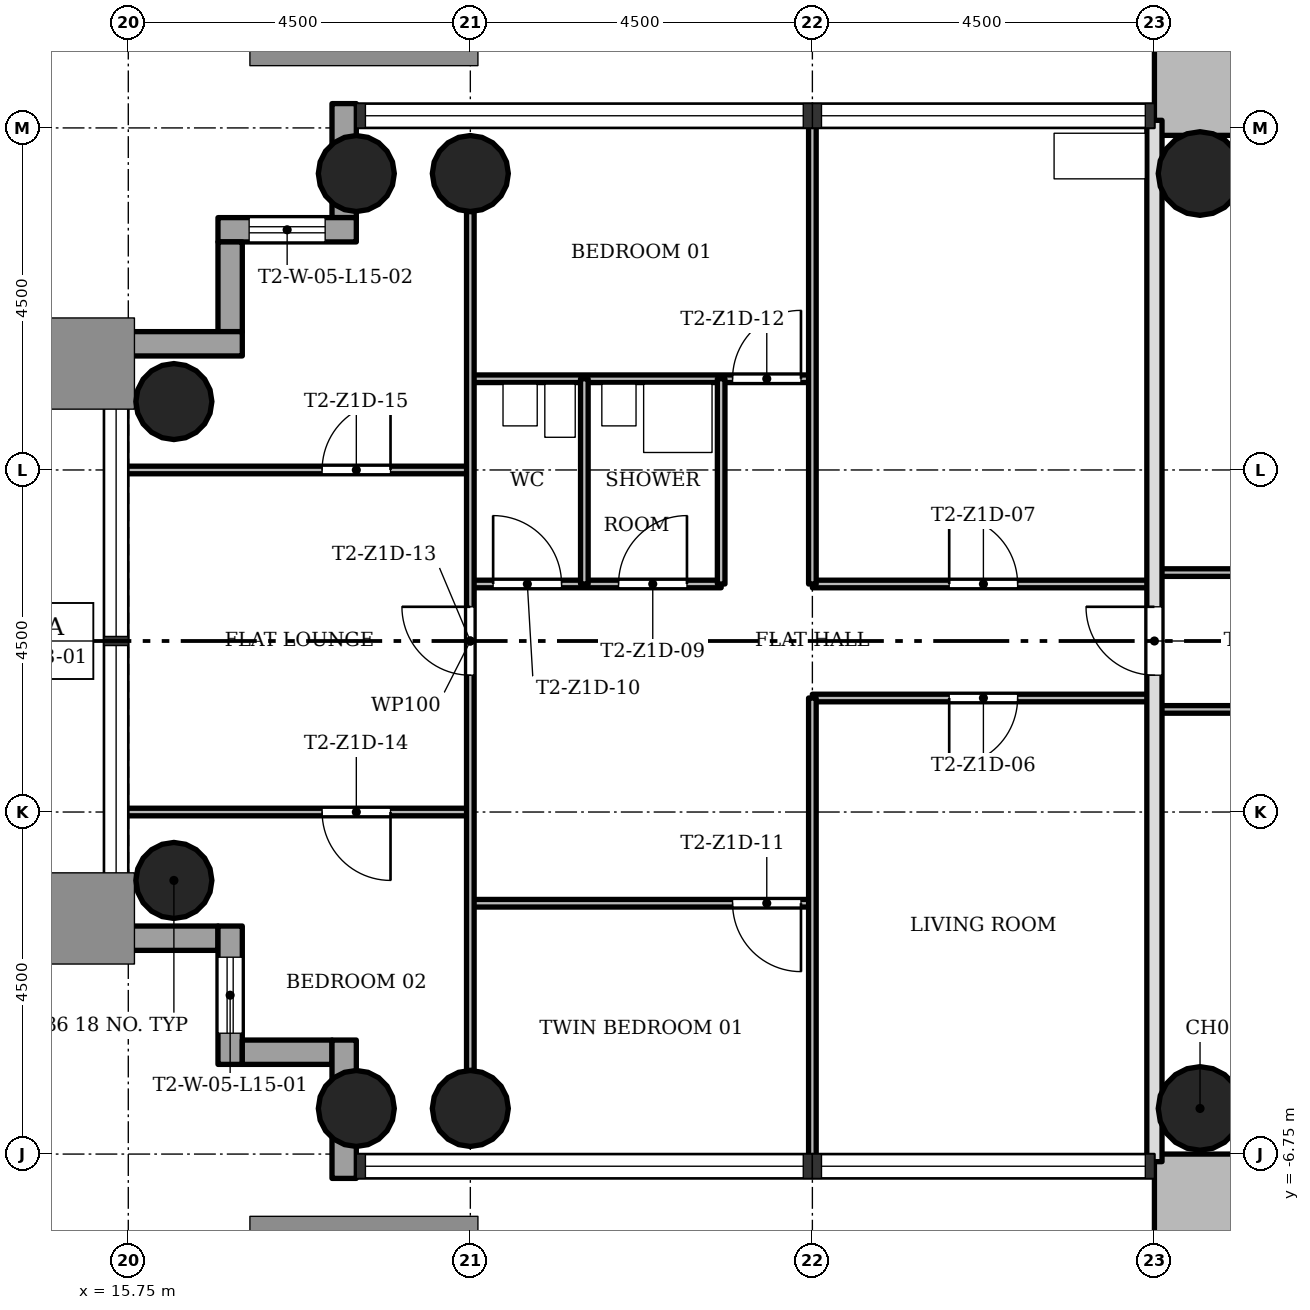
"""IFC4 building model, lengths in metres.
Left out: names, types, materials, properties, quantities, classifications, styles, units other than length and angle.
Written with IfcOpenShell. Run it as: python <this file> out.ifc"""

import sys

from ifc_helpers import new_model, si_unit, direction, frame, frame_2d, origin, origin_2d, place, context, subcontext, project, spatial, rectangle, hollow_circle, extrude, element, fill, save


model = new_model("IFC4")
c1 = context("Model", 3, precision=1e-05, world=origin(), true_north=direction((0.0, 1.0)))
c2 = subcontext(c1, "Body", "Model", "MODEL_VIEW")
j1 = project(units=[si_unit("LENGTHUNIT", "METRE"), si_unit("PLANEANGLEUNIT", "RADIAN")], contexts=[c1])
p1 = place(None, origin())
s1 = spatial("IfcSite", under=j1, at=p1, CompositionType="ELEMENT")
p2 = place(p1, origin())
s2 = spatial("IfcBuilding", under=s1, at=p2, CompositionType="ELEMENT")
p3 = place(p2, frame((0.0, 0.0, 58.5)))
s3 = spatial("IfcBuildingStorey", under=s2, at=p3, CompositionType="ELEMENT", Elevation=58.5)
p4 = place(p3, frame((29.8, 15.248, 0.0), z_axis=(0.0, 0.0, 1.0), x_axis=(0.0, -1.0, 0.0)))
e1 = element("IfcWall", 1, at=p4, inside=s3, PredefinedType="SHEAR", context=c2, shape_type="SweptSolid", body=[
    extrude(rectangle(XDim=8.596, YDim=1.1, at=frame_2d((4.298, 0.0))), origin(), (0.0, 0.0, 1.0), 3.4),
])
p5 = place(p3, frame((41.65, -7.3, 0.0), z_axis=(0.0, 0.0, 1.0), x_axis=(-1.0, 0.0, 0.0)))
e2 = element("IfcWall", 2, at=p5, inside=s3, PredefinedType="SHEAR", context=c2, shape_type="SweptSolid", body=[
    extrude(rectangle(XDim=12.4, YDim=1.1, at=frame_2d((6.2, 0.0))), origin(), (0.0, 0.0, 1.0), 3.4),
])
p6 = place(p5, frame((4.75, 0.0, 0.0)))
e3 = element("IfcOpeningElement", 3, at=p6, cuts=e2, PredefinedType="OPENING", context=c2, shape_type="SweptSolid", body=[
    extrude(rectangle(XDim=1.8, YDim=2.1, at=frame_2d((0.9, 1.05))), frame((0.0, 0.56, 0.0), z_axis=(0.0, -1.0, 0.0), x_axis=(1.0, 0.0, 0.0)), (0.0, 0.0, 1.0), 1.12),
])
for number, where, z_axis, x_axis in (
    (4, (20.25, 6.15, 0.0), (0.0, 0.0, 1.0), (1.0, 0.0, 0.0)),
    (5, (20.25, -6.15, 0.0), (0.0, 0.0, 1.0), (1.0, 0.0, 0.0)),
    (6, (18.75, 6.15, 0.0), (0.0, 0.0, 1.0), (1.0, 0.0, 0.0)),
    (7, (18.75, -6.15, 0.0), (0.0, 0.0, 1.0), (1.0, 0.0, 0.0)),
    (8, (16.35, 3.15, 0.0), (0.0, 0.0, 1.0), (1.0, 0.0, 0.0)),
    (9, (16.35, -3.15, 0.0), (0.0, 0.0, 1.0), (1.0, 0.0, 0.0)),
):
    element("IfcColumn", number, at=place(p3, frame(where, z_axis=z_axis, x_axis=x_axis)), inside=s3, PredefinedType="COLUMN", context=c2, shape_type="SweptSolid", body=[
        extrude(hollow_circle(Radius=0.5, WallThickness=0.036, at=origin_2d()), origin(), (0.0, 0.0, 1.0), 3.4),
    ])
for number, where, z_axis, x_axis in (
    (10, (29.85, 6.15, 0.0), (0.0, 0.0, 1.0), (1.0, 0.0, 0.0)),
    (11, (29.85, -6.15, 0.0), (0.0, 0.0, 1.0), (1.0, 0.0, 0.0)),
):
    element("IfcColumn", number, at=place(p3, frame(where, z_axis=z_axis, x_axis=x_axis)), inside=s3, PredefinedType="COLUMN", context=c2, shape_type="SweptSolid", body=[
        extrude(hollow_circle(Radius=0.55, WallThickness=0.04, at=origin_2d()), origin(), (0.0, 0.0, 1.0), 3.4),
    ])
p7 = place(p3, frame((18.59, 7.07, -0.3), z_axis=(0.0, 0.0, 1.0), x_axis=(0.0, -1.0, 0.0)))
e12 = element("IfcWall", 12, at=p7, inside=s3, PredefinedType="STANDARD", context=c2, shape_type="SweptSolid", body=[
    extrude(rectangle(XDim=1.5, YDim=0.32, at=frame_2d((0.75, 0.0))), origin(), (0.0, 0.0, 1.0), 3.4),
])
p8 = place(p3, frame((18.75, 5.41, -0.3), z_axis=(0.0, 0.0, 1.0), x_axis=(-1.0, 0.0, 0.0)))
e13 = element("IfcWall", 13, at=p8, inside=s3, PredefinedType="STANDARD", context=c2, shape_type="SweptSolid", body=[
    extrude(rectangle(XDim=1.82, YDim=0.32, at=frame_2d((0.91, 0.0))), origin(), (0.0, 0.0, 1.0), 3.4),
])
p9 = place(p8, frame((0.41, 0.0, 1.2)))
e14 = element("IfcOpeningElement", 14, at=p9, cuts=e13, PredefinedType="OPENING", context=c2, shape_type="SweptSolid", body=[
    extrude(rectangle(XDim=1.0, YDim=1.5, at=frame_2d((0.5, 0.75))), frame((0.0, 0.17, 0.0), z_axis=(0.0, -1.0, 0.0), x_axis=(1.0, 0.0, 0.0)), (0.0, 0.0, 1.0), 0.34),
])
p10 = place(p3, frame((17.09, 5.25, -0.3), z_axis=(0.0, 0.0, 1.0), x_axis=(0.0, -1.0, 0.0)))
e15 = element("IfcWall", 15, at=p10, inside=s3, PredefinedType="STANDARD", context=c2, shape_type="SweptSolid", body=[
    extrude(rectangle(XDim=1.18, YDim=0.32, at=frame_2d((0.59, 0.0))), origin(), (0.0, 0.0, 1.0), 3.4),
])
p11 = place(p3, frame((17.25, 3.91, -0.3), z_axis=(0.0, 0.0, 1.0), x_axis=(-1.0, 0.0, 0.0)))
e16 = element("IfcWall", 16, at=p11, inside=s3, PredefinedType="STANDARD", context=c2, shape_type="SweptSolid", body=[
    extrude(rectangle(XDim=1.82, YDim=0.32, at=frame_2d((0.91, 0.0))), origin(), (0.0, 0.0, 1.0), 3.4),
])
p12 = place(p3, frame((15.43, -3.91, -0.3), z_axis=(0.0, 0.0, 1.0), x_axis=(1.0, 0.0, 0.0)))
e17 = element("IfcWall", 17, at=p12, inside=s3, PredefinedType="STANDARD", context=c2, shape_type="SweptSolid", body=[
    extrude(rectangle(XDim=1.5, YDim=0.32, at=frame_2d((0.75, 0.0))), origin(), (0.0, 0.0, 1.0), 3.4),
])
p13 = place(p3, frame((17.09, -3.75, -0.3), z_axis=(0.0, 0.0, 1.0), x_axis=(0.0, -1.0, 0.0)))
e18 = element("IfcWall", 18, at=p13, inside=s3, PredefinedType="STANDARD", context=c2, shape_type="SweptSolid", body=[
    extrude(rectangle(XDim=1.82, YDim=0.32, at=frame_2d((0.91, 0.0))), origin(), (0.0, 0.0, 1.0), 3.4),
])
p14 = place(p13, frame((0.41, 0.0, 1.2)))
e19 = element("IfcOpeningElement", 19, at=p14, cuts=e18, PredefinedType="OPENING", context=c2, shape_type="SweptSolid", body=[
    extrude(rectangle(XDim=1.0, YDim=1.5, at=frame_2d((0.5, 0.75))), frame((0.0, 0.17, 0.0), z_axis=(0.0, -1.0, 0.0), x_axis=(1.0, 0.0, 0.0)), (0.0, 0.0, 1.0), 0.34),
])
p15 = place(p3, frame((17.25, -5.41, -0.3), z_axis=(0.0, 0.0, 1.0), x_axis=(1.0, 0.0, 0.0)))
e20 = element("IfcWall", 20, at=p15, inside=s3, PredefinedType="STANDARD", context=c2, shape_type="SweptSolid", body=[
    extrude(rectangle(XDim=1.18, YDim=0.32, at=frame_2d((0.59, 0.0))), origin(), (0.0, 0.0, 1.0), 3.4),
])
p16 = place(p3, frame((18.59, -5.25, -0.3), z_axis=(0.0, 0.0, 1.0), x_axis=(0.0, -1.0, 0.0)))
e21 = element("IfcWall", 21, at=p16, inside=s3, PredefinedType="STANDARD", context=c2, shape_type="SweptSolid", body=[
    extrude(rectangle(XDim=1.82, YDim=0.32, at=frame_2d((0.91, 0.0))), origin(), (0.0, 0.0, 1.0), 3.4),
])
p17 = place(p3, frame((24.75, -3.45, 0.0), z_axis=(0.0, 0.0, 1.0), x_axis=(-1.0, 0.0, 0.0)))
e22 = element("IfcWall", 22, at=p17, inside=s3, PredefinedType="PARTITIONING", context=c2, shape_type="SweptSolid", body=[
    extrude(rectangle(XDim=4.5, YDim=0.1, at=frame_2d((2.25, 0.0))), origin(), (0.0, 0.0, 1.0), 3.0),
])
p18 = place(p17, frame((0.15, 0.0, 0.0)))
e23 = element("IfcOpeningElement", 23, at=p18, cuts=e22, PredefinedType="OPENING", context=c2, shape_type="SweptSolid", body=[
    extrude(rectangle(XDim=0.9, YDim=2.1, at=frame_2d((0.45, 1.05))), frame((0.0, 0.06, 0.0), z_axis=(0.0, -1.0, 0.0), x_axis=(1.0, 0.0, 0.0)), (0.0, 0.0, 1.0), 0.12),
])
p19 = place(p3, frame((20.25, -2.25, 0.0), z_axis=(0.0, 0.0, 1.0), x_axis=(-1.0, 0.0, 0.0)))
e24 = element("IfcWall", 24, at=p19, inside=s3, PredefinedType="PARTITIONING", context=c2, shape_type="SweptSolid", body=[
    extrude(rectangle(XDim=4.6, YDim=0.1, at=frame_2d((2.3, 0.0))), origin(), (0.0, 0.0, 1.0), 3.0),
])
p20 = place(p19, frame((1.05, 0.0, 0.0)))
e25 = element("IfcOpeningElement", 25, at=p20, cuts=e24, PredefinedType="OPENING", context=c2, shape_type="SweptSolid", body=[
    extrude(rectangle(XDim=0.9, YDim=2.1, at=frame_2d((0.45, 1.05))), frame((0.0, 0.06, 0.0), z_axis=(0.0, -1.0, 0.0), x_axis=(1.0, 0.0, 0.0)), (0.0, 0.0, 1.0), 0.12),
])
p21 = place(p3, frame((34.5, -0.9, 0.0), z_axis=(0.0, 0.0, 1.0), x_axis=(-1.0, 0.0, 0.0)))
e26 = element("IfcWall", 26, at=p21, inside=s3, PredefinedType="PARTITIONING", context=c2, shape_type="SweptSolid", body=[
    extrude(rectangle(XDim=5.25, YDim=0.1, at=frame_2d((2.625, 0.0))), origin(), (0.0, 0.0, 1.0), 3.0),
])
p22 = place(p3, frame((29.25, -0.75, 0.0), z_axis=(0.0, 0.0, 1.0), x_axis=(-1.0, 0.0, 0.0)))
e27 = element("IfcWall", 27, at=p22, inside=s3, PredefinedType="PARTITIONING", context=c2, shape_type="SweptSolid", body=[
    extrude(rectangle(XDim=4.5, YDim=0.1, at=frame_2d((2.25, 0.0))), origin(), (0.0, 0.0, 1.0), 3.0),
])
p23 = place(p22, frame((1.8, 0.0, 0.0)))
e28 = element("IfcOpeningElement", 28, at=p23, cuts=e27, PredefinedType="OPENING", context=c2, shape_type="SweptSolid", body=[
    extrude(rectangle(XDim=0.9, YDim=2.1, at=frame_2d((0.45, 1.05))), frame((0.0, 0.06, 0.0), z_axis=(0.0, -1.0, 0.0), x_axis=(1.0, 0.0, 0.0)), (0.0, 0.0, 1.0), 0.12),
])
p24 = place(p3, frame((29.25, 0.75, 0.0), z_axis=(0.0, 0.0, 1.0), x_axis=(-1.0, 0.0, 0.0)))
e29 = element("IfcWall", 29, at=p24, inside=s3, PredefinedType="PARTITIONING", context=c2, shape_type="SweptSolid", body=[
    extrude(rectangle(XDim=4.5, YDim=0.1, at=frame_2d((2.25, 0.0))), origin(), (0.0, 0.0, 1.0), 3.0),
])
p25 = place(p24, frame((1.8, 0.0, 0.0)))
e30 = element("IfcOpeningElement", 30, at=p25, cuts=e29, PredefinedType="OPENING", context=c2, shape_type="SweptSolid", body=[
    extrude(rectangle(XDim=0.9, YDim=2.1, at=frame_2d((0.45, 1.05))), frame((0.0, 0.06, 0.0), z_axis=(0.0, -1.0, 0.0), x_axis=(1.0, 0.0, 0.0)), (0.0, 0.0, 1.0), 0.12),
])
p26 = place(p3, frame((23.55, 0.75, 0.0), z_axis=(0.0, 0.0, 1.0), x_axis=(-1.0, 0.0, 0.0)))
e31 = element("IfcWall", 31, at=p26, inside=s3, PredefinedType="PARTITIONING", context=c2, shape_type="SweptSolid", body=[
    extrude(rectangle(XDim=3.3, YDim=0.1, at=frame_2d((1.65, 0.0))), origin(), (0.0, 0.0, 1.0), 3.0),
])
p27 = place(p26, frame((0.45, 0.0, 0.0)))
e32 = element("IfcOpeningElement", 32, at=p27, cuts=e31, PredefinedType="OPENING", context=c2, shape_type="SweptSolid", body=[
    extrude(rectangle(XDim=0.9, YDim=2.1, at=frame_2d((0.45, 1.05))), frame((0.0, 0.06, 0.0), z_axis=(0.0, -1.0, 0.0), x_axis=(1.0, 0.0, 0.0)), (0.0, 0.0, 1.0), 0.12),
])
p28 = place(p26, frame((2.1, 0.0, 0.0)))
e33 = element("IfcOpeningElement", 33, at=p28, cuts=e31, PredefinedType="OPENING", context=c2, shape_type="SweptSolid", body=[
    extrude(rectangle(XDim=0.9, YDim=2.1, at=frame_2d((0.45, 1.05))), frame((0.0, 0.06, 0.0), z_axis=(0.0, -1.0, 0.0), x_axis=(1.0, 0.0, 0.0)), (0.0, 0.0, 1.0), 0.12),
])
p29 = place(p3, frame((34.5, 0.9, 0.0), z_axis=(0.0, 0.0, 1.0), x_axis=(-1.0, 0.0, 0.0)))
e34 = element("IfcWall", 34, at=p29, inside=s3, PredefinedType="PARTITIONING", context=c2, shape_type="SweptSolid", body=[
    extrude(rectangle(XDim=5.25, YDim=0.1, at=frame_2d((2.625, 0.0))), origin(), (0.0, 0.0, 1.0), 3.0),
])
p30 = place(p3, frame((20.25, 2.25, 0.0), z_axis=(0.0, 0.0, 1.0), x_axis=(-1.0, 0.0, 0.0)))
e35 = element("IfcWall", 35, at=p30, inside=s3, PredefinedType="PARTITIONING", context=c2, shape_type="SweptSolid", body=[
    extrude(rectangle(XDim=4.6, YDim=0.1, at=frame_2d((2.3, 0.0))), origin(), (0.0, 0.0, 1.0), 3.0),
])
p31 = place(p30, frame((1.05, 0.0, 0.0)))
e36 = element("IfcOpeningElement", 36, at=p31, cuts=e35, PredefinedType="OPENING", context=c2, shape_type="SweptSolid", body=[
    extrude(rectangle(XDim=0.9, YDim=2.1, at=frame_2d((0.45, 1.05))), frame((0.0, 0.06, 0.0), z_axis=(0.0, -1.0, 0.0), x_axis=(1.0, 0.0, 0.0)), (0.0, 0.0, 1.0), 0.12),
])
p32 = place(p3, frame((24.75, 3.45, 0.0), z_axis=(0.0, 0.0, 1.0), x_axis=(-1.0, 0.0, 0.0)))
e37 = element("IfcWall", 37, at=p32, inside=s3, PredefinedType="PARTITIONING", context=c2, shape_type="SweptSolid", body=[
    extrude(rectangle(XDim=4.5, YDim=0.1, at=frame_2d((2.25, 0.0))), origin(), (0.0, 0.0, 1.0), 3.0),
])
p33 = place(p32, frame((0.15, 0.0, 0.0)))
e38 = element("IfcOpeningElement", 38, at=p33, cuts=e37, PredefinedType="OPENING", context=c2, shape_type="SweptSolid", body=[
    extrude(rectangle(XDim=0.9, YDim=2.1, at=frame_2d((0.45, 1.05))), frame((0.0, 0.06, 0.0), z_axis=(0.0, -1.0, 0.0), x_axis=(1.0, 0.0, 0.0)), (0.0, 0.0, 1.0), 0.12),
])
p34 = place(p3, frame((29.25, -6.85, 0.0), z_axis=(0.0, 0.0, 1.0), x_axis=(0.0, 1.0, 0.0)))
e39 = element("IfcWall", 39, at=p34, inside=s3, PredefinedType="SOLIDWALL", context=c2, shape_type="SweptSolid", body=[
    extrude(rectangle(XDim=13.7, YDim=0.2, at=frame_2d((6.85, 0.0))), origin(), (0.0, 0.0, 1.0), 3.0),
])
p35 = place(p34, frame((6.4, 0.0, 0.0)))
e40 = element("IfcOpeningElement", 40, at=p35, cuts=e39, PredefinedType="OPENING", context=c2, shape_type="SweptSolid", body=[
    extrude(rectangle(XDim=0.9, YDim=2.1, at=frame_2d((0.45, 1.05))), frame((0.0, 0.11, 0.0), z_axis=(0.0, -1.0, 0.0), x_axis=(1.0, 0.0, 0.0)), (0.0, 0.0, 1.0), 0.22),
])
for number, where, z_axis, x_axis in (
    (41, (24.75, -6.85, 0.0), (0.0, 0.0, 1.0), (0.0, 1.0, 0.0)),
    (42, (24.75, 0.75, 0.0), (0.0, 0.0, 1.0), (0.0, 1.0, 0.0)),
):
    element("IfcWall", number, at=place(p3, frame(where, z_axis=z_axis, x_axis=x_axis)), inside=s3, PredefinedType="PARTITIONING", context=c2, shape_type="SweptSolid", body=[
        extrude(rectangle(XDim=6.1, YDim=0.1, at=frame_2d((3.05, 0.0))), origin(), (0.0, 0.0, 1.0), 3.0),
    ])
for number, where, z_axis, x_axis in (
    (43, (23.55, 0.75, 0.0), (0.0, 0.0, 1.0), (0.0, 1.0, 0.0)),
    (44, (21.75, 0.75, 0.0), (0.0, 0.0, 1.0), (0.0, 1.0, 0.0)),
):
    element("IfcWall", number, at=place(p3, frame(where, z_axis=z_axis, x_axis=x_axis)), inside=s3, PredefinedType="PARTITIONING", context=c2, shape_type="SweptSolid", body=[
        extrude(rectangle(XDim=2.7, YDim=0.1, at=frame_2d((1.35, 0.0))), origin(), (0.0, 0.0, 1.0), 3.0),
    ])
p36 = place(p3, frame((20.25, -5.65, 0.0), z_axis=(0.0, 0.0, 1.0), x_axis=(0.0, 1.0, 0.0)))
e45 = element("IfcWall", 45, at=p36, inside=s3, PredefinedType="PARTITIONING", context=c2, shape_type="SweptSolid", body=[
    extrude(rectangle(XDim=11.3, YDim=0.1, at=frame_2d((5.65, 0.0))), origin(), (0.0, 0.0, 1.0), 3.0),
])
p37 = place(p36, frame((5.2, 0.0, 0.0)))
e46 = element("IfcOpeningElement", 46, at=p37, cuts=e45, PredefinedType="OPENING", context=c2, shape_type="SweptSolid", body=[
    extrude(rectangle(XDim=0.9, YDim=2.1, at=frame_2d((0.45, 1.05))), frame((0.0, 0.06, 0.0), z_axis=(0.0, -1.0, 0.0), x_axis=(1.0, 0.0, 0.0)), (0.0, 0.0, 1.0), 0.12),
])
p38 = place(p23, origin())
e47 = element("IfcDoor", 47, at=p38, inside=s3, OperationType="SINGLE_SWING_LEFT", PredefinedType="DOOR", context=c2, shape_type="SweptSolid", body=[
    extrude(rectangle(XDim=0.9, YDim=2.1, at=frame_2d((0.45, 1.05))), frame((0.0, 0.025, 0.0), z_axis=(0.0, -1.0, 0.0), x_axis=(1.0, 0.0, 0.0)), (0.0, 0.0, 1.0), 0.05),
])
fill(e28, e47)
p39 = place(p25, origin())
e48 = element("IfcDoor", 48, at=p39, inside=s3, OperationType="SINGLE_SWING_RIGHT", PredefinedType="DOOR", context=c2, shape_type="SweptSolid", body=[
    extrude(rectangle(XDim=0.9, YDim=2.1, at=frame_2d((0.45, 1.05))), frame((0.0, 0.025, 0.0), z_axis=(0.0, -1.0, 0.0), x_axis=(1.0, 0.0, 0.0)), (0.0, 0.0, 1.0), 0.05),
])
fill(e30, e48)
p40 = place(p35, origin())
e49 = element("IfcDoor", 49, at=p40, inside=s3, OperationType="SINGLE_SWING_LEFT", PredefinedType="DOOR", context=c2, shape_type="SweptSolid", body=[
    extrude(rectangle(XDim=0.9, YDim=2.1, at=frame_2d((0.45, 1.05))), frame((0.0, 0.025, 0.0), z_axis=(0.0, -1.0, 0.0), x_axis=(1.0, 0.0, 0.0)), (0.0, 0.0, 1.0), 0.05),
])
fill(e40, e49)
p41 = place(p27, origin())
e50 = element("IfcDoor", 50, at=p41, inside=s3, OperationType="SINGLE_SWING_LEFT", PredefinedType="DOOR", context=c2, shape_type="SweptSolid", body=[
    extrude(rectangle(XDim=0.9, YDim=2.1, at=frame_2d((0.45, 1.05))), frame((0.0, 0.025, 0.0), z_axis=(0.0, -1.0, 0.0), x_axis=(1.0, 0.0, 0.0)), (0.0, 0.0, 1.0), 0.05),
])
fill(e32, e50)
p42 = place(p28, origin())
e51 = element("IfcDoor", 51, at=p42, inside=s3, OperationType="SINGLE_SWING_RIGHT", PredefinedType="DOOR", context=c2, shape_type="SweptSolid", body=[
    extrude(rectangle(XDim=0.9, YDim=2.1, at=frame_2d((0.45, 1.05))), frame((0.0, 0.025, 0.0), z_axis=(0.0, -1.0, 0.0), x_axis=(1.0, 0.0, 0.0)), (0.0, 0.0, 1.0), 0.05),
])
fill(e33, e51)
p43 = place(p18, origin())
e52 = element("IfcDoor", 52, at=p43, inside=s3, OperationType="SINGLE_SWING_RIGHT", PredefinedType="DOOR", context=c2, shape_type="SweptSolid", body=[
    extrude(rectangle(XDim=0.9, YDim=2.1, at=frame_2d((0.45, 1.05))), frame((0.0, 0.025, 0.0), z_axis=(0.0, -1.0, 0.0), x_axis=(1.0, 0.0, 0.0)), (0.0, 0.0, 1.0), 0.05),
])
fill(e23, e52)
p44 = place(p33, origin())
e53 = element("IfcDoor", 53, at=p44, inside=s3, OperationType="SINGLE_SWING_LEFT", PredefinedType="DOOR", context=c2, shape_type="SweptSolid", body=[
    extrude(rectangle(XDim=0.9, YDim=2.1, at=frame_2d((0.45, 1.05))), frame((0.0, 0.025, 0.0), z_axis=(0.0, -1.0, 0.0), x_axis=(1.0, 0.0, 0.0)), (0.0, 0.0, 1.0), 0.05),
])
fill(e38, e53)
p45 = place(p37, origin())
e54 = element("IfcDoor", 54, at=p45, inside=s3, OperationType="SINGLE_SWING_LEFT", PredefinedType="DOOR", context=c2, shape_type="SweptSolid", body=[
    extrude(rectangle(XDim=0.9, YDim=2.1, at=frame_2d((0.45, 1.05))), frame((0.0, 0.025, 0.0), z_axis=(0.0, -1.0, 0.0), x_axis=(1.0, 0.0, 0.0)), (0.0, 0.0, 1.0), 0.05),
])
fill(e46, e54)
p46 = place(p20, origin())
e55 = element("IfcDoor", 55, at=p46, inside=s3, OperationType="SINGLE_SWING_RIGHT", PredefinedType="DOOR", context=c2, shape_type="SweptSolid", body=[
    extrude(rectangle(XDim=0.9, YDim=2.1, at=frame_2d((0.45, 1.05))), frame((0.0, 0.025, 0.0), z_axis=(0.0, -1.0, 0.0), x_axis=(1.0, 0.0, 0.0)), (0.0, 0.0, 1.0), 0.05),
])
fill(e25, e55)
p47 = place(p31, origin())
e56 = element("IfcDoor", 56, at=p47, inside=s3, OperationType="SINGLE_SWING_LEFT", PredefinedType="DOOR", context=c2, shape_type="SweptSolid", body=[
    extrude(rectangle(XDim=0.9, YDim=2.1, at=frame_2d((0.45, 1.05))), frame((0.0, 0.025, 0.0), z_axis=(0.0, -1.0, 0.0), x_axis=(1.0, 0.0, 0.0)), (0.0, 0.0, 1.0), 0.05),
])
fill(e36, e56)
p48 = place(p14, origin())
e57 = element("IfcWindow", 57, at=p48, inside=s3, PartitioningType="SINGLE_PANEL", PredefinedType="WINDOW", context=c2, shape_type="SweptSolid", body=[
    extrude(rectangle(XDim=1.0, YDim=1.5, at=frame_2d((0.5, 0.75))), frame((0.0, 0.03, 0.0), z_axis=(0.0, -1.0, 0.0), x_axis=(1.0, 0.0, 0.0)), (0.0, 0.0, 1.0), 0.06),
])
fill(e19, e57)
p49 = place(p9, origin())
e58 = element("IfcWindow", 58, at=p49, inside=s3, PartitioningType="SINGLE_PANEL", PredefinedType="WINDOW", context=c2, shape_type="SweptSolid", body=[
    extrude(rectangle(XDim=1.0, YDim=1.5, at=frame_2d((0.5, 0.75))), frame((0.0, 0.03, 0.0), z_axis=(0.0, -1.0, 0.0), x_axis=(1.0, 0.0, 0.0)), (0.0, 0.0, 1.0), 0.06),
])
fill(e14, e58)
save(model, sys.argv[1])
